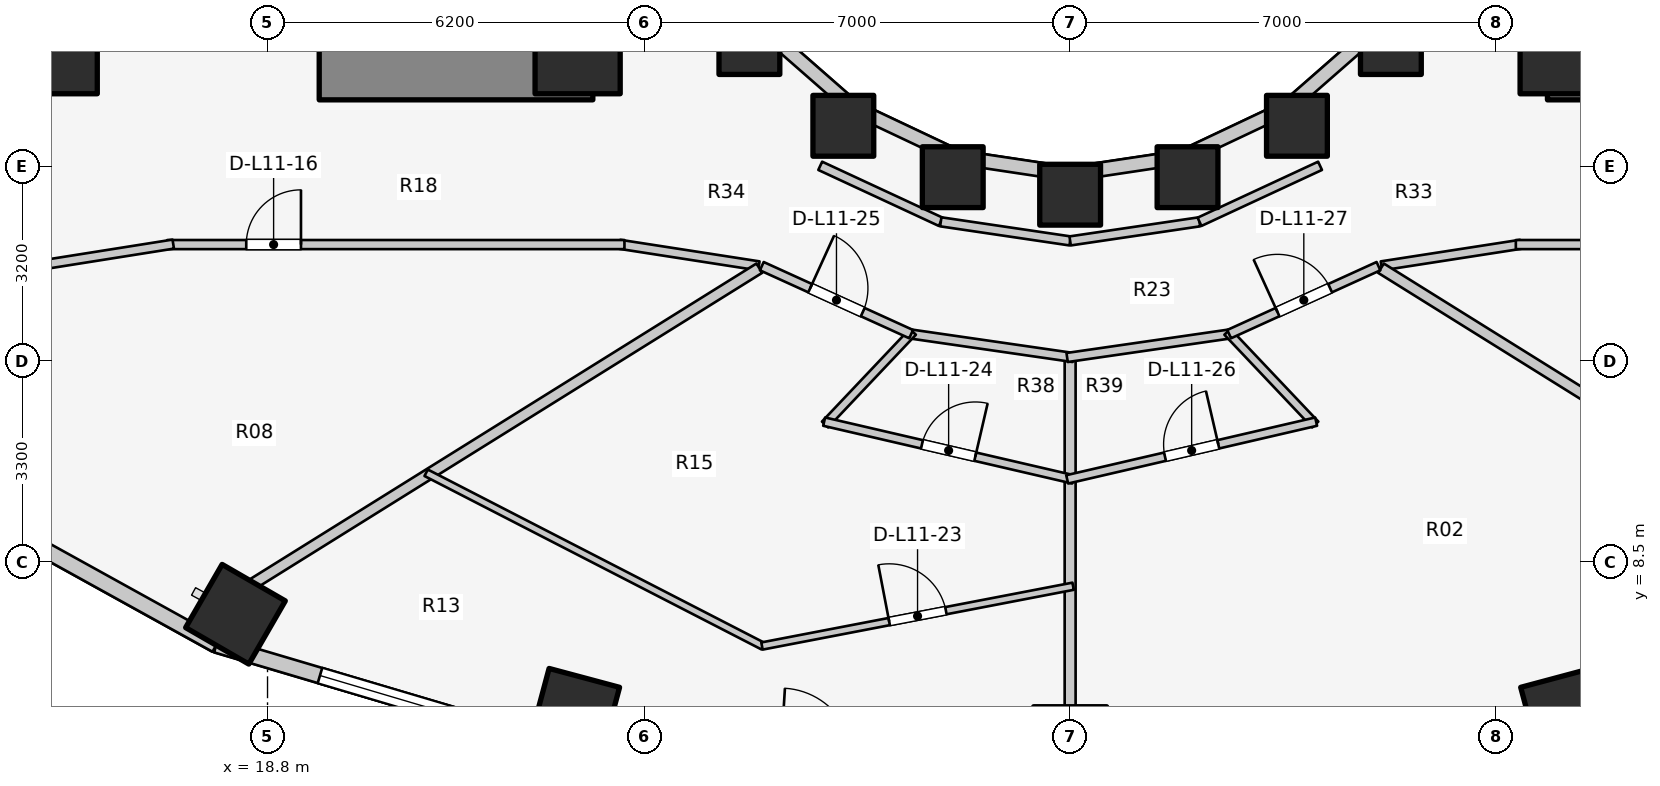
"""IFC4 building model, lengths in metres.
Left out: names, types, materials, properties, quantities, classifications, styles, units other than length and angle.
Written with IfcOpenShell. Run it as: python <this file> out.ifc"""

import sys

from ifc_helpers import new_model, si_unit, direction, frame, frame_2d, origin, origin_2d, place, context, subcontext, project, spatial, rectangle, extrude, element, fill, save


model = new_model("IFC4")
c1 = context("Model", 3, precision=1e-05, world=origin(), true_north=direction((0.0, 1.0)))
c2 = subcontext(c1, "Body", "Model", "MODEL_VIEW")
j1 = project(units=[si_unit("LENGTHUNIT", "METRE"), si_unit("PLANEANGLEUNIT", "RADIAN")], contexts=[c1])
p1 = place(None, origin())
s1 = spatial("IfcSite", under=j1, at=p1, CompositionType="ELEMENT")
p2 = place(p1, origin())
s2 = spatial("IfcBuilding", under=s1, at=p2, CompositionType="ELEMENT")
p3 = place(p2, frame((0.0, 0.0, 40.0)))
s3 = spatial("IfcBuildingStorey", under=s2, at=p3, CompositionType="ELEMENT", Elevation=40.0)
for number, where, z_axis, x_axis in (
    (1, (19.65, 16.55, 0.0), (0.0, 0.0, 1.0), (1.0, 0.0, 0.0)),
    (2, (39.85, 16.55, 0.0), (0.0, 0.0, 1.0), (1.0, 0.0, 0.0)),
):
    element("IfcWall", number, at=place(p3, frame(where, z_axis=z_axis, x_axis=x_axis)), inside=s3, PredefinedType="SHEAR", context=c2, shape_type="SweptSolid", body=[
        extrude(rectangle(XDim=4.5, YDim=0.9, at=frame_2d((2.25, 0.0))), origin(), (0.0, 0.0, 1.0), 3.1),
    ])
for number, where, z_axis, x_axis in (
    (3, (15.3, 16.9, 0.0), (0.0, 0.0, 1.0), (1.0, 0.0, 0.0)),
    (4, (23.9, 16.9, 0.0), (0.0, 0.0, 1.0), (1.0, 0.0, 0.0)),
    (5, (40.1, 16.9, 0.0), (0.0, 0.0, 1.0), (1.0, 0.0, 0.0)),
):
    element("IfcColumn", number, at=place(p3, frame(where, z_axis=z_axis, x_axis=x_axis)), inside=s3, PredefinedType="COLUMN", context=c2, shape_type="SweptSolid", body=[
        extrude(rectangle(XDim=1.4, YDim=1.4, at=origin_2d()), origin(), (0.0, 0.0, 1.0), 3.1),
    ])
for number, where, z_axis, x_axis in (
    (6, (26.725, 17.018, 0.0), (0.0, 0.0, 1.0), (1.0, 0.0, 0.0)),
    (7, (28.27, 15.673, 0.0), (0.0, 0.0, 1.0), (1.0, 0.0, 0.0)),
):
    element("IfcColumn", number, at=place(p3, frame(where, z_axis=z_axis, x_axis=x_axis)), inside=s3, PredefinedType="COLUMN", context=c2, shape_type="SweptSolid", body=[
        extrude(rectangle(XDim=1.0, YDim=1.0, at=origin_2d()), origin(), (0.0, 0.0, 1.0), 3.1),
    ])
p4 = place(p3, frame((18.273, 7.641, 0.0), z_axis=(0.0, 0.0, 1.0), x_axis=(-0.5, -0.866025403784, 0.0)))
e8 = element("IfcColumn", 8, at=p4, inside=s3, PredefinedType="COLUMN", context=c2, shape_type="SweptSolid", body=[
    extrude(rectangle(XDim=1.2, YDim=1.2, at=origin_2d()), origin(), (0.0, 0.0, 1.0), 3.1),
])
p5 = place(p3, frame((30.069, 14.828, 0.0), z_axis=(0.0, 0.0, 1.0), x_axis=(1.0, 0.0, 0.0)))
e9 = element("IfcColumn", 9, at=p5, inside=s3, PredefinedType="COLUMN", context=c2, shape_type="SweptSolid", body=[
    extrude(rectangle(XDim=1.0, YDim=1.0, at=origin_2d()), origin(), (0.0, 0.0, 1.0), 3.1),
])
p6 = place(p3, frame((23.855, 6.014, 0.0), z_axis=(0.0, 0.0, 1.0), x_axis=(-0.258819045103, -0.965925826289, 0.0)))
e10 = element("IfcColumn", 10, at=p6, inside=s3, PredefinedType="COLUMN", context=c2, shape_type="SweptSolid", body=[
    extrude(rectangle(XDim=1.2, YDim=1.2, at=origin_2d()), origin(), (0.0, 0.0, 1.0), 3.1),
])
for number, where, z_axis, x_axis in (
    (11, (32.0, 14.54, 0.0), (0.0, 0.0, 1.0), (1.0, 0.0, 0.0)),
    (12, (33.931, 14.828, 0.0), (0.0, 0.0, 1.0), (1.0, 0.0, 0.0)),
):
    element("IfcColumn", number, at=place(p3, frame(where, z_axis=z_axis, x_axis=x_axis)), inside=s3, PredefinedType="COLUMN", context=c2, shape_type="SweptSolid", body=[
        extrude(rectangle(XDim=1.0, YDim=1.0, at=origin_2d()), origin(), (0.0, 0.0, 1.0), 3.1),
    ])
p7 = place(p3, frame((40.145, 6.014, 0.0), z_axis=(0.0, 0.0, 1.0), x_axis=(0.258819045103, -0.965925826289, 0.0)))
e13 = element("IfcColumn", 13, at=p7, inside=s3, PredefinedType="COLUMN", context=c2, shape_type="SweptSolid", body=[
    extrude(rectangle(XDim=1.2, YDim=1.2, at=origin_2d()), origin(), (0.0, 0.0, 1.0), 3.1),
])
for number, where, z_axis, x_axis in (
    (14, (35.73, 15.673, 0.0), (0.0, 0.0, 1.0), (1.0, 0.0, 0.0)),
    (15, (37.275, 17.018, 0.0), (0.0, 0.0, 1.0), (1.0, 0.0, 0.0)),
):
    element("IfcColumn", number, at=place(p3, frame(where, z_axis=z_axis, x_axis=x_axis)), inside=s3, PredefinedType="COLUMN", context=c2, shape_type="SweptSolid", body=[
        extrude(rectangle(XDim=1.0, YDim=1.0, at=origin_2d()), origin(), (0.0, 0.0, 1.0), 3.1),
    ])
p8 = place(p3, frame((26.965, 17.258, 0.0), z_axis=(0.0, 0.0, 1.0), x_axis=(0.752576694707, -0.658504607869, 0.0)))
e16 = element("IfcWall", 16, at=p8, inside=s3, PredefinedType="STANDARD", context=c2, shape_type="SweptSolid", body=[
    extrude(rectangle(XDim=1.959, YDim=0.23, at=frame_2d((0.98, 0.0))), origin(), (0.0, 0.0, 1.0), 2.16),
])
p9 = place(p3, frame((28.44, 15.968, 0.0), z_axis=(0.0, 0.0, 1.0), x_axis=(0.904179699603, -0.427152280606, 0.0)))
e17 = element("IfcWall", 17, at=p9, inside=s3, PredefinedType="STANDARD", context=c2, shape_type="SweptSolid", body=[
    extrude(rectangle(XDim=1.899, YDim=0.23, at=frame_2d((0.95, 0.0))), origin(), (0.0, 0.0, 1.0), 2.16),
])
for number, where, z_axis, x_axis in (
    (18, (30.157, 15.157, 0.0), (0.0, 0.0, 1.0), (0.989, -0.149, 0.0)),
    (19, (32.0, 14.88, 0.0), (0.0, 0.0, 1.0), (0.989, 0.149, 0.0)),
):
    element("IfcWall", number, at=place(p3, frame(where, z_axis=z_axis, x_axis=x_axis)), inside=s3, PredefinedType="STANDARD", context=c2, shape_type="SweptSolid", body=[
        extrude(rectangle(XDim=1.864, YDim=0.23, at=frame_2d((0.932, 0.0))), origin(), (0.0, 0.0, 1.0), 2.16),
    ])
p10 = place(p3, frame((33.843, 15.157, 0.0), z_axis=(0.0, 0.0, 1.0), x_axis=(0.904179699603, 0.427152280606, 0.0)))
e20 = element("IfcWall", 20, at=p10, inside=s3, PredefinedType="STANDARD", context=c2, shape_type="SweptSolid", body=[
    extrude(rectangle(XDim=1.899, YDim=0.23, at=frame_2d((0.95, 0.0))), origin(), (0.0, 0.0, 1.0), 2.16),
])
p11 = place(p3, frame((35.56, 15.968, 0.0), z_axis=(0.0, 0.0, 1.0), x_axis=(0.752576694707, 0.658504607869, 0.0)))
e21 = element("IfcWall", 21, at=p11, inside=s3, PredefinedType="STANDARD", context=c2, shape_type="SweptSolid", body=[
    extrude(rectangle(XDim=1.959, YDim=0.23, at=frame_2d((0.98, 0.0))), origin(), (0.0, 0.0, 1.0), 2.16),
])
p12 = place(p3, frame((13.595, 9.55, 0.0), z_axis=(0.0, 0.0, 1.0), x_axis=(0.875137303239, -0.483874674352, 0.0)))
e22 = element("IfcWall", 22, at=p12, inside=s3, PredefinedType="STANDARD", context=c2, shape_type="SweptSolid", body=[
    extrude(rectangle(XDim=4.985, YDim=0.26, at=frame_2d((2.493, 0.0))), origin(), (0.0, 0.0, 1.0), 2.85),
])
p13 = place(p3, frame((17.958, 7.138, 0.0), z_axis=(0.0, 0.0, 1.0), x_axis=(0.958843593522, -0.283934786811, 0.0)))
e23 = element("IfcWall", 23, at=p13, inside=s3, PredefinedType="STANDARD", context=c2, shape_type="SweptSolid", body=[
    extrude(rectangle(XDim=5.955, YDim=0.26, at=frame_2d((2.978, 0.0))), origin(), (0.0, 0.0, 1.0), 2.85),
])
p14 = place(p13, frame((1.778, 0.0, 0.75)))
e24 = element("IfcOpeningElement", 24, at=p14, cuts=e23, PredefinedType="OPENING", context=c2, shape_type="SweptSolid", body=[
    extrude(rectangle(XDim=2.4, YDim=1.7, at=frame_2d((1.2, 0.85))), frame((0.0, 0.14, 0.0), z_axis=(0.0, -1.0, 0.0), x_axis=(1.0, 0.0, 0.0)), (0.0, 0.0, 1.0), 0.28),
])
p15 = place(p3, frame((40.332, 5.447, 0.0), z_axis=(0.0, 0.0, 1.0), x_axis=(0.958843593522, 0.283934786811, 0.0)))
e25 = element("IfcWall", 25, at=p15, inside=s3, PredefinedType="STANDARD", context=c2, shape_type="SweptSolid", body=[
    extrude(rectangle(XDim=5.955, YDim=0.26, at=frame_2d((2.978, 0.0))), origin(), (0.0, 0.0, 1.0), 2.85),
])
p16 = place(p15, frame((1.778, 0.0, 0.75)))
e26 = element("IfcOpeningElement", 26, at=p16, cuts=e25, PredefinedType="OPENING", context=c2, shape_type="SweptSolid", body=[
    extrude(rectangle(XDim=2.4, YDim=1.7, at=frame_2d((1.2, 0.85))), frame((0.0, 0.14, 0.0), z_axis=(0.0, -1.0, 0.0), x_axis=(1.0, 0.0, 0.0)), (0.0, 0.0, 1.0), 0.28),
])
p17 = place(p3, frame((27.89, 15.015, 0.0), z_axis=(0.0, 0.0, 1.0), x_axis=(0.906943449489, -0.421252393975, 0.0)))
e27 = element("IfcWall", 27, at=p17, inside=s3, PredefinedType="PARTITIONING", context=c2, shape_type="SweptSolid", body=[
    extrude(rectangle(XDim=2.186, YDim=0.15, at=frame_2d((1.093, 0.0))), origin(), (0.0, 0.0, 1.0), 2.237),
])
for number, where, z_axis, x_axis in (
    (28, (29.873, 14.094, 0.0), (0.0, 0.0, 1.0), (0.989, -0.146, 0.0)),
    (29, (32.0, 13.78, 0.0), (0.0, 0.0, 1.0), (0.989, 0.146, 0.0)),
):
    element("IfcWall", number, at=place(p3, frame(where, z_axis=z_axis, x_axis=x_axis)), inside=s3, PredefinedType="PARTITIONING", context=c2, shape_type="SweptSolid", body=[
        extrude(rectangle(XDim=2.151, YDim=0.15, at=frame_2d((1.075, 0.0))), origin(), (0.0, 0.0, 1.0), 2.237),
    ])
p18 = place(p3, frame((34.127, 14.094, 0.0), z_axis=(0.0, 0.0, 1.0), x_axis=(0.906943449489, 0.421252393975, 0.0)))
e30 = element("IfcWall", 30, at=p18, inside=s3, PredefinedType="PARTITIONING", context=c2, shape_type="SweptSolid", body=[
    extrude(rectangle(XDim=2.186, YDim=0.15, at=frame_2d((1.093, 0.0))), origin(), (0.0, 0.0, 1.0), 2.237),
])
p19 = place(p3, frame((26.881, 13.369, 0.0), z_axis=(0.0, 0.0, 1.0), x_axis=(-0.988184633586, 0.153268163508, 0.0)))
e31 = element("IfcWall", 31, at=p19, inside=s3, PredefinedType="PARTITIONING", context=c2, shape_type="SweptSolid", body=[
    extrude(rectangle(XDim=2.318, YDim=0.15, at=frame_2d((1.159, 0.0))), origin(), (0.0, 0.0, 1.0), 2.237),
])
p20 = place(p3, frame((17.15, 13.72, 0.0), z_axis=(0.0, 0.0, 1.0), x_axis=(1.0, 0.0, 0.0)))
e32 = element("IfcWall", 32, at=p20, inside=s3, PredefinedType="PARTITIONING", context=c2, shape_type="SweptSolid", body=[
    extrude(rectangle(XDim=7.52, YDim=0.15, at=frame_2d((3.76, 0.0))), origin(), (0.0, 0.0, 1.0), 2.237),
])
p21 = place(p20, frame((1.3, 0.0, 0.0)))
e33 = element("IfcOpeningElement", 33, at=p21, cuts=e32, PredefinedType="OPENING", context=c2, shape_type="SweptSolid", body=[
    extrude(rectangle(XDim=0.9, YDim=2.1, at=frame_2d((0.45, 1.05))), frame((0.0, 0.085, 0.0), z_axis=(0.0, -1.0, 0.0), x_axis=(1.0, 0.0, 0.0)), (0.0, 0.0, 1.0), 0.17),
])
p22 = place(p3, frame((17.25, 13.728, 0.0), z_axis=(0.0, 0.0, 1.0), x_axis=(-0.987655781226, -0.156639898525, 0.0)))
e34 = element("IfcWall", 34, at=p22, inside=s3, PredefinedType="PARTITIONING", context=c2, shape_type="SweptSolid", body=[
    extrude(rectangle(XDim=7.552, YDim=0.15, at=frame_2d((3.776, 0.0))), origin(), (0.0, 0.0, 1.0), 2.069),
])
p23 = place(p3, frame((37.119, 13.369, 0.0), z_axis=(0.0, 0.0, 1.0), x_axis=(0.988184633586, 0.153268163508, 0.0)))
e35 = element("IfcWall", 35, at=p23, inside=s3, PredefinedType="PARTITIONING", context=c2, shape_type="SweptSolid", body=[
    extrude(rectangle(XDim=2.318, YDim=0.15, at=frame_2d((1.159, 0.0))), origin(), (0.0, 0.0, 1.0), 2.237),
])
p24 = place(p3, frame((39.33, 13.72, 0.0), z_axis=(0.0, 0.0, 1.0), x_axis=(1.0, 0.0, 0.0)))
e36 = element("IfcWall", 36, at=p24, inside=s3, PredefinedType="PARTITIONING", context=c2, shape_type="SweptSolid", body=[
    extrude(rectangle(XDim=7.52, YDim=0.15, at=frame_2d((3.76, 0.0))), origin(), (0.0, 0.0, 1.0), 2.237),
])
p25 = place(p24, frame((5.22, 0.0, 0.0)))
e37 = element("IfcOpeningElement", 37, at=p25, cuts=e36, PredefinedType="OPENING", context=c2, shape_type="SweptSolid", body=[
    extrude(rectangle(XDim=0.9, YDim=2.1, at=frame_2d((0.45, 1.05))), frame((0.0, 0.085, 0.0), z_axis=(0.0, -1.0, 0.0), x_axis=(1.0, 0.0, 0.0)), (0.0, 0.0, 1.0), 0.17),
])
p26 = place(p3, frame((26.888, 13.332, 0.0), z_axis=(0.0, 0.0, 1.0), x_axis=(-0.848647785721, -0.52895834977, 0.0)))
e38 = element("IfcWall", 38, at=p26, inside=s3, PredefinedType="PARTITIONING", context=c2, shape_type="SweptSolid", body=[
    extrude(rectangle(XDim=9.81, YDim=0.18, at=frame_2d((4.905, 0.0))), origin(), (0.0, 0.0, 1.0), 2.237),
])
p27 = place(p3, frame((32.0, 11.815, 0.0), z_axis=(0.0, 0.0, 1.0), x_axis=(0.0, -1.0, 0.0)))
e39 = element("IfcWall", 39, at=p27, inside=s3, PredefinedType="PARTITIONING", context=c2, shape_type="SweptSolid", body=[
    extrude(rectangle(XDim=5.715, YDim=0.18, at=frame_2d((2.857, 0.0))), origin(), (0.0, 0.0, 1.0), 2.237),
])
p28 = place(p3, frame((37.112, 13.332, 0.0), z_axis=(0.0, 0.0, 1.0), x_axis=(0.848647785721, -0.52895834977, 0.0)))
e40 = element("IfcWall", 40, at=p28, inside=s3, PredefinedType="PARTITIONING", context=c2, shape_type="SweptSolid", body=[
    extrude(rectangle(XDim=9.81, YDim=0.18, at=frame_2d((4.905, 0.0))), origin(), (0.0, 0.0, 1.0), 2.237),
])
p29 = place(p3, frame((21.409, 9.967, 0.0), z_axis=(0.0, 0.0, 1.0), x_axis=(0.889172609005, -0.457571930296, 0.0)))
e41 = element("IfcWall", 41, at=p29, inside=s3, PredefinedType="MOVABLE", context=c2, shape_type="SweptSolid", body=[
    extrude(rectangle(XDim=6.232, YDim=0.12, at=frame_2d((3.116, 0.0))), origin(), (0.0, 0.0, 1.0), 2.237),
])
p30 = place(p3, frame((26.932, 7.118, 0.0), z_axis=(0.0, 0.0, 1.0), x_axis=(0.982039182538, 0.188677089126, 0.0)))
e42 = element("IfcWall", 42, at=p30, inside=s3, PredefinedType="MOVABLE", context=c2, shape_type="SweptSolid", body=[
    extrude(rectangle(XDim=5.211, YDim=0.12, at=frame_2d((2.605, 0.0))), origin(), (0.0, 0.0, 1.0), 2.237),
])
p31 = place(p30, frame((2.131, 0.0, 0.0)))
e43 = element("IfcOpeningElement", 43, at=p31, cuts=e42, PredefinedType="OPENING", context=c2, shape_type="SweptSolid", body=[
    extrude(rectangle(XDim=0.95, YDim=2.1, at=frame_2d((0.475, 1.05))), frame((0.0, 0.07, 0.0), z_axis=(0.0, -1.0, 0.0), x_axis=(1.0, 0.0, 0.0)), (0.0, 0.0, 1.0), 0.14),
])
p32 = place(p3, frame((29.329, 12.256, 0.0), z_axis=(0.0, 0.0, 1.0), x_axis=(0.989701115085, -0.143149232617, 0.0)))
e44 = element("IfcWall", 44, at=p32, inside=s3, PredefinedType="PARTITIONING", context=c2, shape_type="SweptSolid", body=[
    extrude(rectangle(XDim=2.749, YDim=0.15, at=frame_2d((1.375, 0.0))), origin(), (0.0, 0.0, 1.0), 2.237),
])
p33 = place(p3, frame((29.413, 12.285, 0.0), z_axis=(0.0, 0.0, 1.0), x_axis=(-0.687544693502, -0.72614206216, 0.0)))
e45 = element("IfcWall", 45, at=p33, inside=s3, PredefinedType="PLUMBINGWALL", context=c2, shape_type="SweptSolid", body=[
    extrude(rectangle(XDim=2.1, YDim=0.14, at=frame_2d((1.05, 0.0))), origin(), (0.0, 0.0, 1.0), 2.855),
])
p34 = place(p3, frame((27.954, 10.808, 0.0), z_axis=(0.0, 0.0, 1.0), x_axis=(0.974148813221, -0.225907259071, 0.0)))
e46 = element("IfcWall", 46, at=p34, inside=s3, PredefinedType="PLUMBINGWALL", context=c2, shape_type="SweptSolid", body=[
    extrude(rectangle(XDim=4.203, YDim=0.14, at=frame_2d((2.102, 0.0))), origin(), (0.0, 0.0, 1.0), 2.237),
])
p35 = place(p34, frame((1.652, 0.0, 0.0)))
e47 = element("IfcOpeningElement", 47, at=p35, cuts=e46, PredefinedType="OPENING", context=c2, shape_type="SweptSolid", body=[
    extrude(rectangle(XDim=0.9, YDim=2.1, at=frame_2d((0.45, 1.05))), frame((0.0, 0.08, 0.0), z_axis=(0.0, -1.0, 0.0), x_axis=(1.0, 0.0, 0.0)), (0.0, 0.0, 1.0), 0.16),
])
p36 = place(p3, frame((26.929, 13.365, 0.0), z_axis=(0.0, 0.0, 1.0), x_axis=(0.910186679378, -0.414198272186, 0.0)))
e48 = element("IfcWall", 48, at=p36, inside=s3, PredefinedType="PARTITIONING", context=c2, shape_type="SweptSolid", body=[
    extrude(rectangle(XDim=2.698, YDim=0.15, at=frame_2d((1.349, 0.0))), origin(), (0.0, 0.0, 1.0), 2.237),
])
p37 = place(p36, frame((0.874, 0.0, 0.0)))
e49 = element("IfcOpeningElement", 49, at=p37, cuts=e48, PredefinedType="OPENING", context=c2, shape_type="SweptSolid", body=[
    extrude(rectangle(XDim=0.95, YDim=2.1, at=frame_2d((0.475, 1.05))), frame((0.0, 0.085, 0.0), z_axis=(0.0, -1.0, 0.0), x_axis=(1.0, 0.0, 0.0)), (0.0, 0.0, 1.0), 0.17),
])
p38 = place(p3, frame((31.95, 11.863, 0.0), z_axis=(0.0, 0.0, 1.0), x_axis=(0.989701115085, 0.143149232617, 0.0)))
e50 = element("IfcWall", 50, at=p38, inside=s3, PredefinedType="PARTITIONING", context=c2, shape_type="SweptSolid", body=[
    extrude(rectangle(XDim=2.749, YDim=0.15, at=frame_2d((1.375, 0.0))), origin(), (0.0, 0.0, 1.0), 2.237),
])
p39 = place(p3, frame((34.587, 12.285, 0.0), z_axis=(0.0, 0.0, 1.0), x_axis=(0.687544693502, -0.72614206216, 0.0)))
e51 = element("IfcWall", 51, at=p39, inside=s3, PredefinedType="PLUMBINGWALL", context=c2, shape_type="SweptSolid", body=[
    extrude(rectangle(XDim=2.1, YDim=0.14, at=frame_2d((1.05, 0.0))), origin(), (0.0, 0.0, 1.0), 2.855),
])
p40 = place(p3, frame((31.951, 9.859, 0.0), z_axis=(0.0, 0.0, 1.0), x_axis=(0.974148813221, 0.225907259071, 0.0)))
e52 = element("IfcWall", 52, at=p40, inside=s3, PredefinedType="PLUMBINGWALL", context=c2, shape_type="SweptSolid", body=[
    extrude(rectangle(XDim=4.203, YDim=0.14, at=frame_2d((2.102, 0.0))), origin(), (0.0, 0.0, 1.0), 2.237),
])
p41 = place(p40, frame((1.652, 0.0, 0.0)))
e53 = element("IfcOpeningElement", 53, at=p41, cuts=e52, PredefinedType="OPENING", context=c2, shape_type="SweptSolid", body=[
    extrude(rectangle(XDim=0.9, YDim=2.1, at=frame_2d((0.45, 1.05))), frame((0.0, 0.08, 0.0), z_axis=(0.0, -1.0, 0.0), x_axis=(1.0, 0.0, 0.0)), (0.0, 0.0, 1.0), 0.16),
])
p42 = place(p3, frame((34.615, 12.247, 0.0), z_axis=(0.0, 0.0, 1.0), x_axis=(0.910186679378, 0.414198272186, 0.0)))
e54 = element("IfcWall", 54, at=p42, inside=s3, PredefinedType="PARTITIONING", context=c2, shape_type="SweptSolid", body=[
    extrude(rectangle(XDim=2.698, YDim=0.15, at=frame_2d((1.349, 0.0))), origin(), (0.0, 0.0, 1.0), 2.237),
])
p43 = place(p42, frame((0.874, 0.0, 0.0)))
e55 = element("IfcOpeningElement", 55, at=p43, cuts=e54, PredefinedType="OPENING", context=c2, shape_type="SweptSolid", body=[
    extrude(rectangle(XDim=0.95, YDim=2.1, at=frame_2d((0.475, 1.05))), frame((0.0, 0.085, 0.0), z_axis=(0.0, -1.0, 0.0), x_axis=(1.0, 0.0, 0.0)), (0.0, 0.0, 1.0), 0.17),
])
p44 = place(p14, origin())
e56 = element("IfcWindow", 56, at=p44, inside=s3, PartitioningType="SINGLE_PANEL", PredefinedType="WINDOW", context=c2, shape_type="SweptSolid", body=[
    extrude(rectangle(XDim=2.4, YDim=1.7, at=frame_2d((1.2, 0.85))), frame((0.0, 0.03, 0.0), z_axis=(0.0, -1.0, 0.0), x_axis=(1.0, 0.0, 0.0)), (0.0, 0.0, 1.0), 0.06),
])
fill(e24, e56)
p45 = place(p21, origin())
e57 = element("IfcDoor", 57, at=p45, inside=s3, OperationType="SINGLE_SWING_RIGHT", PredefinedType="DOOR", context=c2, shape_type="SweptSolid", body=[
    extrude(rectangle(XDim=0.9, YDim=2.1, at=frame_2d((0.45, 1.05))), frame((0.0, 0.025, 0.0), z_axis=(0.0, -1.0, 0.0), x_axis=(1.0, 0.0, 0.0)), (0.0, 0.0, 1.0), 0.05),
])
fill(e33, e57)
p46 = place(p31, origin())
e58 = element("IfcDoor", 58, at=p46, inside=s3, OperationType="SINGLE_SWING_LEFT", PredefinedType="DOOR", context=c2, shape_type="SweptSolid", body=[
    extrude(rectangle(XDim=0.95, YDim=2.1, at=frame_2d((0.475, 1.05))), frame((0.0, 0.025, 0.0), z_axis=(0.0, -1.0, 0.0), x_axis=(1.0, 0.0, 0.0)), (0.0, 0.0, 1.0), 0.05),
])
fill(e43, e58)
p47 = place(p35, origin())
e59 = element("IfcDoor", 59, at=p47, inside=s3, OperationType="SINGLE_SWING_RIGHT", PredefinedType="DOOR", context=c2, shape_type="SweptSolid", body=[
    extrude(rectangle(XDim=0.9, YDim=2.1, at=frame_2d((0.45, 1.05))), frame((0.0, 0.025, 0.0), z_axis=(0.0, -1.0, 0.0), x_axis=(1.0, 0.0, 0.0)), (0.0, 0.0, 1.0), 0.05),
])
fill(e47, e59)
p48 = place(p37, origin())
e60 = element("IfcDoor", 60, at=p48, inside=s3, OperationType="SINGLE_SWING_LEFT", PredefinedType="DOOR", context=c2, shape_type="SweptSolid", body=[
    extrude(rectangle(XDim=0.95, YDim=2.1, at=frame_2d((0.475, 1.05))), frame((0.0, 0.025, 0.0), z_axis=(0.0, -1.0, 0.0), x_axis=(1.0, 0.0, 0.0)), (0.0, 0.0, 1.0), 0.05),
])
fill(e49, e60)
p49 = place(p41, origin())
e61 = element("IfcDoor", 61, at=p49, inside=s3, OperationType="SINGLE_SWING_RIGHT", PredefinedType="DOOR", context=c2, shape_type="SweptSolid", body=[
    extrude(rectangle(XDim=0.9, YDim=2.1, at=frame_2d((0.45, 1.05))), frame((0.0, 0.025, 0.0), z_axis=(0.0, -1.0, 0.0), x_axis=(1.0, 0.0, 0.0)), (0.0, 0.0, 1.0), 0.05),
])
fill(e53, e61)
p50 = place(p43, origin())
e62 = element("IfcDoor", 62, at=p50, inside=s3, OperationType="SINGLE_SWING_LEFT", PredefinedType="DOOR", context=c2, shape_type="SweptSolid", body=[
    extrude(rectangle(XDim=0.95, YDim=2.1, at=frame_2d((0.475, 1.05))), frame((0.0, 0.025, 0.0), z_axis=(0.0, -1.0, 0.0), x_axis=(1.0, 0.0, 0.0)), (0.0, 0.0, 1.0), 0.05),
])
fill(e55, e62)
save(model, sys.argv[1])
